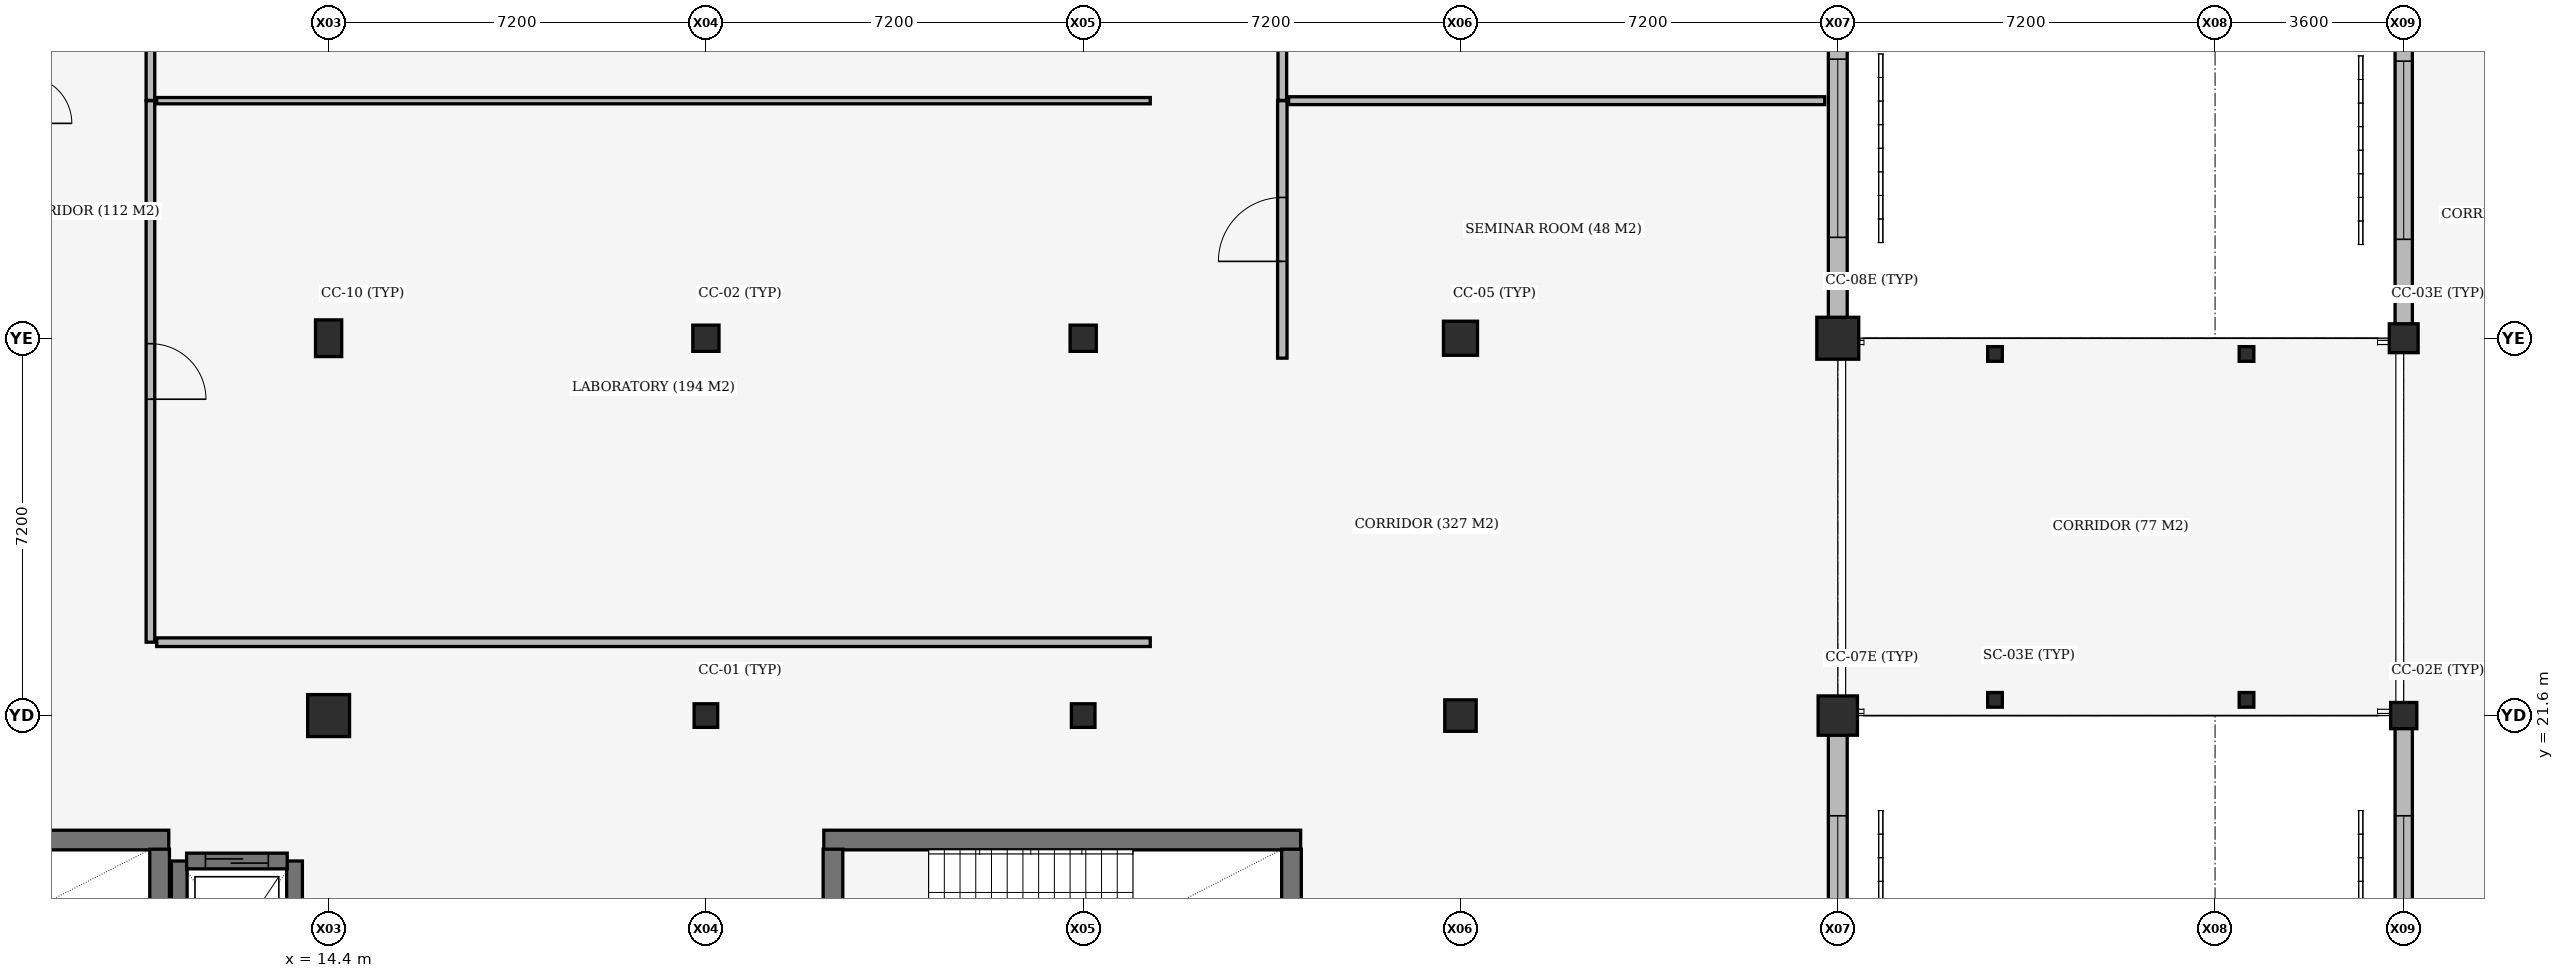
"""IFC4 building model, lengths in metres.
Left out: names, types, materials, properties, quantities, classifications, styles, units other than length and angle.
Written with IfcOpenShell. Run it as: python <this file> out.ifc"""

import sys

from ifc_helpers import new_model, si_unit, direction, frame, frame_2d, origin, origin_2d, place, context, subcontext, project, spatial, rectangle, i_section, extrude, element, fill, save


model = new_model("IFC4")
c1 = context("Model", 3, precision=1e-05, world=origin(), true_north=direction((0.0, 1.0)))
c2 = subcontext(c1, "Body", "Model", "MODEL_VIEW")
j1 = project(units=[si_unit("LENGTHUNIT", "METRE"), si_unit("PLANEANGLEUNIT", "RADIAN")], contexts=[c1])
p1 = place(None, origin())
s1 = spatial("IfcSite", under=j1, at=p1, CompositionType="ELEMENT")
p2 = place(p1, origin())
s2 = spatial("IfcBuilding", under=s1, at=p2, CompositionType="ELEMENT")
p3 = place(p2, frame((0.0, 0.0, 5.4)))
s3 = spatial("IfcBuildingStorey", under=s2, at=p3, CompositionType="ELEMENT", Elevation=5.4)
p4 = place(p3, frame((54.0, 21.6, 0.0), z_axis=(0.0, 0.0, 1.0), x_axis=(1.0, 0.0, 0.0)))
e1 = element("IfcColumn", 1, at=p4, inside=s3, PredefinedType="COLUMN", context=c2, shape_type="SweptSolid", body=[
    extrude(rectangle(XDim=0.5, YDim=0.5, at=origin_2d()), origin(), (0.0, 0.0, 1.0), 3.92),
])
p5 = place(p3, frame((54.0, 28.8, 0.0), z_axis=(0.0, 0.0, 1.0), x_axis=(1.0, 0.0, 0.0)))
e2 = element("IfcColumn", 2, at=p5, inside=s3, PredefinedType="COLUMN", context=c2, shape_type="SweptSolid", body=[
    extrude(rectangle(XDim=0.55, YDim=0.55, at=origin_2d()), origin(), (0.0, 0.0, 1.0), 3.92),
])
p6 = place(p3, frame((14.4, 21.6, 0.0), z_axis=(0.0, 0.0, 1.0), x_axis=(1.0, 0.0, 0.0)))
e3 = element("IfcColumn", 3, at=p6, inside=s3, PredefinedType="COLUMN", context=c2, shape_type="SweptSolid", body=[
    extrude(rectangle(XDim=0.8, YDim=0.8, at=origin_2d()), origin(), (0.0, 0.0, 1.0), 3.89),
])
p7 = place(p3, frame((14.4, 28.8, 0.0), z_axis=(0.0, 0.0, 1.0), x_axis=(1.0, 0.0, 0.0)))
e4 = element("IfcColumn", 4, at=p7, inside=s3, PredefinedType="COLUMN", context=c2, shape_type="SweptSolid", body=[
    extrude(rectangle(XDim=0.5, YDim=0.7, at=origin_2d()), origin(), (0.0, 0.0, 1.0), 3.89),
])
p8 = place(p3, frame((21.6, 21.6, 0.0), z_axis=(0.0, 0.0, 1.0), x_axis=(1.0, 0.0, 0.0)))
e5 = element("IfcColumn", 5, at=p8, inside=s3, PredefinedType="COLUMN", context=c2, shape_type="SweptSolid", body=[
    extrude(rectangle(XDim=0.45, YDim=0.45, at=origin_2d()), origin(), (0.0, 0.0, 1.0), 3.89),
])
p9 = place(p3, frame((21.6, 28.8, 0.0), z_axis=(0.0, 0.0, 1.0), x_axis=(1.0, 0.0, 0.0)))
e6 = element("IfcColumn", 6, at=p9, inside=s3, PredefinedType="COLUMN", context=c2, shape_type="SweptSolid", body=[
    extrude(rectangle(XDim=0.5, YDim=0.5, at=origin_2d()), origin(), (0.0, 0.0, 1.0), 3.89),
])
p10 = place(p3, frame((28.8, 21.6, 0.0), z_axis=(0.0, 0.0, 1.0), x_axis=(1.0, 0.0, 0.0)))
e7 = element("IfcColumn", 7, at=p10, inside=s3, PredefinedType="COLUMN", context=c2, shape_type="SweptSolid", body=[
    extrude(rectangle(XDim=0.45, YDim=0.45, at=origin_2d()), origin(), (0.0, 0.0, 1.0), 3.89),
])
p11 = place(p3, frame((28.8, 28.8, 0.0), z_axis=(0.0, 0.0, 1.0), x_axis=(1.0, 0.0, 0.0)))
e8 = element("IfcColumn", 8, at=p11, inside=s3, PredefinedType="COLUMN", context=c2, shape_type="SweptSolid", body=[
    extrude(rectangle(XDim=0.5, YDim=0.5, at=origin_2d()), origin(), (0.0, 0.0, 1.0), 3.89),
])
p12 = place(p3, frame((36.0, 21.6, 0.0), z_axis=(0.0, 0.0, 1.0), x_axis=(1.0, 0.0, 0.0)))
e9 = element("IfcColumn", 9, at=p12, inside=s3, PredefinedType="COLUMN", context=c2, shape_type="SweptSolid", body=[
    extrude(rectangle(XDim=0.6, YDim=0.6, at=origin_2d()), origin(), (0.0, 0.0, 1.0), 3.89),
])
p13 = place(p3, frame((36.0, 28.8, 0.0), z_axis=(0.0, 0.0, 1.0), x_axis=(1.0, 0.0, 0.0)))
e10 = element("IfcColumn", 10, at=p13, inside=s3, PredefinedType="COLUMN", context=c2, shape_type="SweptSolid", body=[
    extrude(rectangle(XDim=0.65, YDim=0.65, at=origin_2d()), origin(), (0.0, 0.0, 1.0), 3.89),
])
p14 = place(p3, frame((43.2, 21.6, 0.0), z_axis=(0.0, 0.0, 1.0), x_axis=(1.0, 0.0, 0.0)))
e11 = element("IfcColumn", 11, at=p14, inside=s3, PredefinedType="COLUMN", context=c2, shape_type="SweptSolid", body=[
    extrude(rectangle(XDim=0.75, YDim=0.75, at=origin_2d()), origin(), (0.0, 0.0, 1.0), 3.89),
])
p15 = place(p3, frame((43.2, 28.8, 0.0), z_axis=(0.0, 0.0, 1.0), x_axis=(1.0, 0.0, 0.0)))
e12 = element("IfcColumn", 12, at=p15, inside=s3, PredefinedType="COLUMN", context=c2, shape_type="SweptSolid", body=[
    extrude(rectangle(XDim=0.8, YDim=0.8, at=origin_2d()), origin(), (0.0, 0.0, 1.0), 3.89),
])
for number, where, z_axis, x_axis in (
    (13, (46.2, 21.9, 0.0), (0.0, 0.0, 1.0), (1.0, 0.0, 0.0)),
    (14, (51.0, 21.9, 0.0), (0.0, 0.0, 1.0), (1.0, 0.0, 0.0)),
    (15, (46.2, 28.5, 0.0), (0.0, 0.0, 1.0), (1.0, 0.0, 0.0)),
    (16, (51.0, 28.5, 0.0), (0.0, 0.0, 1.0), (1.0, 0.0, 0.0)),
):
    element("IfcColumn", number, at=place(p3, frame(where, z_axis=z_axis, x_axis=x_axis)), inside=s3, PredefinedType="COLUMN", context=c2, shape_type="SweptSolid", body=[
        extrude(i_section(OverallWidth=0.28, OverallDepth=0.28, WebThickness=0.01, FlangeThickness=0.018, FilletRadius=0.024, at=origin_2d()), origin(), (0.0, 0.0, 1.0), 3.935),
    ])
p16 = place(p3, frame((11.35, 19.225, 0.0), z_axis=(0.0, 0.0, 1.0), x_axis=(-1.0, 0.0, 0.0)))
e17 = element("IfcWall", 17, at=p16, inside=s3, PredefinedType="SHEAR", context=c2, shape_type="SweptSolid", body=[
    extrude(rectangle(XDim=9.1, YDim=0.375, at=frame_2d((4.55, 0.0))), origin(), (0.0, 0.0, 1.0), 3.89),
])
p17 = place(p3, frame((11.175, 15.6, 0.0), z_axis=(0.0, 0.0, 1.0), x_axis=(0.0, 1.0, 0.0)))
e18 = element("IfcWall", 18, at=p17, inside=s3, PredefinedType="SHEAR", context=c2, shape_type="SweptSolid", body=[
    extrude(rectangle(XDim=3.45, YDim=0.375, at=frame_2d((1.725, 0.0))), origin(), (0.0, 0.0, 1.0), 3.89),
])
p18 = place(p3, frame((32.95, 19.225, 0.0), z_axis=(0.0, 0.0, 1.0), x_axis=(-1.0, 0.0, 0.0)))
e19 = element("IfcWall", 19, at=p18, inside=s3, PredefinedType="SHEAR", context=c2, shape_type="SweptSolid", body=[
    extrude(rectangle(XDim=9.1, YDim=0.375, at=frame_2d((4.55, 0.0))), origin(), (0.0, 0.0, 1.0), 3.89),
])
p19 = place(p3, frame((32.775, 15.6, 0.0), z_axis=(0.0, 0.0, 1.0), x_axis=(0.0, 1.0, 0.0)))
e20 = element("IfcWall", 20, at=p19, inside=s3, PredefinedType="SHEAR", context=c2, shape_type="SweptSolid", body=[
    extrude(rectangle(XDim=3.45, YDim=0.375, at=frame_2d((1.725, 0.0))), origin(), (0.0, 0.0, 1.0), 3.89),
])
for number, where, z_axis, x_axis in (
    (21, (11.55, 18.825, 0.0), (0.0, 0.0, 1.0), (0.0, -1.0, 0.0)),
    (22, (13.75, 15.825, 0.0), (0.0, 0.0, 1.0), (0.0, 1.0, 0.0)),
):
    element("IfcWall", number, at=place(p3, frame(where, z_axis=z_axis, x_axis=x_axis)), inside=s3, PredefinedType="SHEAR", context=c2, shape_type="SweptSolid", body=[
        extrude(rectangle(XDim=3.0, YDim=0.3, at=frame_2d((1.5, 0.0))), origin(), (0.0, 0.0, 1.0), 3.89),
    ])
p20 = place(p3, frame((54.0, 14.617, 0.0), z_axis=(0.0, 0.0, 1.0), x_axis=(0.0, 1.0, 0.0)))
e23 = element("IfcWall", 23, at=p20, inside=s3, PredefinedType="STANDARD", context=c2, shape_type="SweptSolid", body=[
    extrude(rectangle(XDim=6.741, YDim=0.33, at=frame_2d((3.371, 0.0))), origin(), (0.0, 0.0, 1.0), 3.28),
])
p21 = place(p20, frame((1.67, 0.0, 0.9)))
e24 = element("IfcOpeningElement", 24, at=p21, cuts=e23, PredefinedType="OPENING", context=c2, shape_type="SweptSolid", body=[
    extrude(rectangle(XDim=3.4, YDim=1.5, at=frame_2d((1.7, 0.75))), frame((0.0, 0.175, 0.0), z_axis=(0.0, -1.0, 0.0), x_axis=(1.0, 0.0, 0.0)), (0.0, 0.0, 1.0), 0.35),
])
p22 = place(p3, frame((54.0, 29.067, 0.0), z_axis=(0.0, 0.0, 1.0), x_axis=(0.0, 1.0, 0.0)))
e25 = element("IfcWall", 25, at=p22, inside=s3, PredefinedType="STANDARD", context=c2, shape_type="SweptSolid", body=[
    extrude(rectangle(XDim=6.641, YDim=0.33, at=frame_2d((3.321, 0.0))), origin(), (0.0, 0.0, 1.0), 3.18),
])
p23 = place(p22, frame((1.621, 0.0, 0.9)))
e26 = element("IfcOpeningElement", 26, at=p23, cuts=e25, PredefinedType="OPENING", context=c2, shape_type="SweptSolid", body=[
    extrude(rectangle(XDim=3.4, YDim=1.5, at=frame_2d((1.7, 0.75))), frame((0.0, 0.175, 0.0), z_axis=(0.0, -1.0, 0.0), x_axis=(1.0, 0.0, 0.0)), (0.0, 0.0, 1.0), 0.35),
])
p24 = place(p3, frame((43.2, 21.233, 0.0), z_axis=(0.0, 0.0, 1.0), x_axis=(0.0, -1.0, 0.0)))
e27 = element("IfcWall", 27, at=p24, inside=s3, PredefinedType="STANDARD", context=c2, shape_type="SweptSolid", body=[
    extrude(rectangle(XDim=6.491, YDim=0.36, at=frame_2d((3.246, 0.0))), origin(), (0.0, 0.0, 1.0), 3.21),
])
p25 = place(p24, frame((1.545, 0.0, 0.9)))
e28 = element("IfcOpeningElement", 28, at=p25, cuts=e27, PredefinedType="OPENING", context=c2, shape_type="SweptSolid", body=[
    extrude(rectangle(XDim=3.4, YDim=1.5, at=frame_2d((1.7, 0.75))), frame((0.0, 0.19, 0.0), z_axis=(0.0, -1.0, 0.0), x_axis=(1.0, 0.0, 0.0)), (0.0, 0.0, 1.0), 0.38),
])
p26 = place(p3, frame((43.2, 35.658, 0.0), z_axis=(0.0, 0.0, 1.0), x_axis=(0.0, -1.0, 0.0)))
e29 = element("IfcWall", 29, at=p26, inside=s3, PredefinedType="STANDARD", context=c2, shape_type="SweptSolid", body=[
    extrude(rectangle(XDim=6.466, YDim=0.36, at=frame_2d((3.233, 0.0))), origin(), (0.0, 0.0, 1.0), 3.37),
])
p27 = place(p26, frame((1.533, 0.0, 0.9)))
e30 = element("IfcOpeningElement", 30, at=p27, cuts=e29, PredefinedType="OPENING", context=c2, shape_type="SweptSolid", body=[
    extrude(rectangle(XDim=3.4, YDim=1.5, at=frame_2d((1.7, 0.75))), frame((0.0, 0.19, 0.0), z_axis=(0.0, -1.0, 0.0), x_axis=(1.0, 0.0, 0.0)), (0.0, 0.0, 1.0), 0.38),
])
p28 = place(p3, frame((24.025, 19.05, 0.0), z_axis=(0.0, 0.0, 1.0), x_axis=(0.0, -1.0, 0.0)))
e31 = element("IfcWall", 31, at=p28, inside=s3, PredefinedType="SHEAR", context=c2, shape_type="SweptSolid", body=[
    extrude(rectangle(XDim=3.45, YDim=0.375, at=frame_2d((1.725, 0.0))), origin(), (0.0, 0.0, 1.0), 3.89),
])
p29 = place(p28, frame((1.035, 0.0, 0.0)))
e32 = element("IfcOpeningElement", 32, at=p29, cuts=e31, PredefinedType="OPENING", context=c2, shape_type="SweptSolid", body=[
    extrude(rectangle(XDim=1.38, YDim=2.2, at=frame_2d((0.69, 1.1))), frame((0.0, 0.198, 0.0), z_axis=(0.0, -1.0, 0.0), x_axis=(1.0, 0.0, 0.0)), (0.0, 0.0, 1.0), 0.395),
])
p30 = place(p3, frame((11.69, 18.825, 0.0), z_axis=(0.0, 0.0, 1.0), x_axis=(1.0, 0.0, 0.0)))
e33 = element("IfcWall", 33, at=p30, inside=s3, PredefinedType="SHEAR", context=c2, shape_type="SweptSolid", body=[
    extrude(rectangle(XDim=1.92, YDim=0.3, at=frame_2d((0.96, 0.0))), origin(), (0.0, 0.0, 1.0), 3.89),
])
p31 = place(p30, frame((0.36, 0.0, 0.0)))
e34 = element("IfcOpeningElement", 34, at=p31, cuts=e33, PredefinedType="OPENING", context=c2, shape_type="SweptSolid", body=[
    extrude(rectangle(XDim=1.2, YDim=2.1, at=frame_2d((0.6, 1.05))), frame((0.0, 0.16, 0.0), z_axis=(0.0, -1.0, 0.0), x_axis=(1.0, 0.0, 0.0)), (0.0, 0.0, 1.0), 0.32),
])
p32 = place(p3, frame((11.0, 23.0, 0.0), z_axis=(0.0, 0.0, 1.0), x_axis=(0.0, 1.0, 0.0)))
e35 = element("IfcWall", 35, at=p32, inside=s3, PredefinedType="PARTITIONING", context=c2, shape_type="SweptSolid", body=[
    extrude(rectangle(XDim=10.333, YDim=0.165, at=frame_2d((5.167, 0.0))), origin(), (0.0, 0.0, 1.0), 3.21),
])
p33 = place(p32, frame((4.636, 0.0, 0.0)))
e36 = element("IfcOpeningElement", 36, at=p33, cuts=e35, PredefinedType="OPENING", context=c2, shape_type="SweptSolid", body=[
    extrude(rectangle(XDim=1.06, YDim=2.2, at=frame_2d((0.53, 1.1))), frame((0.0, 0.093, 0.0), z_axis=(0.0, -1.0, 0.0), x_axis=(1.0, 0.0, 0.0)), (0.0, 0.0, 1.0), 0.185),
])
p34 = place(p3, frame((11.12, 23.0, 0.0), z_axis=(0.0, 0.0, 1.0), x_axis=(1.0, 0.0, 0.0)))
e37 = element("IfcWall", 37, at=p34, inside=s3, PredefinedType="PARTITIONING", context=c2, shape_type="SweptSolid", body=[
    extrude(rectangle(XDim=18.96, YDim=0.165, at=frame_2d((9.48, 0.0))), origin(), (0.0, 0.0, 1.0), 3.21),
])
p35 = place(p3, frame((11.12, 33.333, 0.0), z_axis=(0.0, 0.0, 1.0), x_axis=(1.0, 0.0, 0.0)))
e38 = element("IfcWall", 38, at=p35, inside=s3, PredefinedType="PARTITIONING", context=c2, shape_type="SweptSolid", body=[
    extrude(rectangle(XDim=18.96, YDim=0.12, at=frame_2d((9.48, 0.0))), origin(), (0.0, 0.0, 1.0), 3.15),
])
p36 = place(p3, frame((11.0, 33.338, 0.0), z_axis=(0.0, 0.0, 1.0), x_axis=(0.0, 1.0, 0.0)))
e39 = element("IfcWall", 39, at=p36, inside=s3, PredefinedType="PARTITIONING", context=c2, shape_type="SweptSolid", body=[
    extrude(rectangle(XDim=12.912, YDim=0.165, at=frame_2d((6.456, 0.0))), origin(), (0.0, 0.0, 1.0), 3.15),
])
p37 = place(p36, frame((5.931, 0.0, 0.0)))
e40 = element("IfcOpeningElement", 40, at=p37, cuts=e39, PredefinedType="OPENING", context=c2, shape_type="SweptSolid", body=[
    extrude(rectangle(XDim=1.05, YDim=2.2, at=frame_2d((0.525, 1.1))), frame((0.0, 0.093, 0.0), z_axis=(0.0, -1.0, 0.0), x_axis=(1.0, 0.0, 0.0)), (0.0, 0.0, 1.0), 0.185),
])
p38 = place(p3, frame((32.6, 28.42, 0.0), z_axis=(0.0, 0.0, 1.0), x_axis=(0.0, 1.0, 0.0)))
e41 = element("IfcWall", 41, at=p38, inside=s3, PredefinedType="PARTITIONING", context=c2, shape_type="SweptSolid", body=[
    extrude(rectangle(XDim=4.913, YDim=0.18, at=frame_2d((2.457, 0.0))), origin(), (0.0, 0.0, 1.0), 3.31),
])
p39 = place(p38, frame((1.846, 0.0, 0.0)))
e42 = element("IfcOpeningElement", 42, at=p39, cuts=e41, PredefinedType="OPENING", context=c2, shape_type="SweptSolid", body=[
    extrude(rectangle(XDim=1.22, YDim=2.25, at=frame_2d((0.61, 1.125))), frame((0.0, 0.1, 0.0), z_axis=(0.0, -1.0, 0.0), x_axis=(1.0, 0.0, 0.0)), (0.0, 0.0, 1.0), 0.2),
])
p40 = place(p3, frame((32.72, 33.333, 0.0), z_axis=(0.0, 0.0, 1.0), x_axis=(1.0, 0.0, 0.0)))
e43 = element("IfcWall", 43, at=p40, inside=s3, PredefinedType="PARTITIONING", context=c2, shape_type="SweptSolid", body=[
    extrude(rectangle(XDim=10.23, YDim=0.15, at=frame_2d((5.115, 0.0))), origin(), (0.0, 0.0, 1.0), 3.21),
])
p41 = place(p3, frame((32.6, 33.338, 0.0), z_axis=(0.0, 0.0, 1.0), x_axis=(0.0, 1.0, 0.0)))
e44 = element("IfcWall", 44, at=p41, inside=s3, PredefinedType="PARTITIONING", context=c2, shape_type="SweptSolid", body=[
    extrude(rectangle(XDim=12.912, YDim=0.165, at=frame_2d((6.456, 0.0))), origin(), (0.0, 0.0, 1.0), 3.25),
])
p42 = place(p41, frame((5.926, 0.0, 0.0)))
e45 = element("IfcOpeningElement", 45, at=p42, cuts=e44, PredefinedType="OPENING", context=c2, shape_type="SweptSolid", body=[
    extrude(rectangle(XDim=1.06, YDim=2.2, at=frame_2d((0.53, 1.1))), frame((0.0, 0.093, 0.0), z_axis=(0.0, -1.0, 0.0), x_axis=(1.0, 0.0, 0.0)), (0.0, 0.0, 1.0), 0.185),
])
p43 = place(p21, origin())
e46 = element("IfcWindow", 46, at=p43, inside=s3, PartitioningType="DOUBLE_PANEL_VERTICAL", PredefinedType="WINDOW", context=c2, shape_type="SweptSolid", body=[
    extrude(rectangle(XDim=3.4, YDim=1.5, at=frame_2d((1.7, 0.75))), frame((0.0, 0.03, 0.0), z_axis=(0.0, -1.0, 0.0), x_axis=(1.0, 0.0, 0.0)), (0.0, 0.0, 1.0), 0.06),
])
fill(e24, e46)
p44 = place(p23, origin())
e47 = element("IfcWindow", 47, at=p44, inside=s3, PartitioningType="DOUBLE_PANEL_VERTICAL", PredefinedType="WINDOW", context=c2, shape_type="SweptSolid", body=[
    extrude(rectangle(XDim=3.4, YDim=1.5, at=frame_2d((1.7, 0.75))), frame((0.0, 0.03, 0.0), z_axis=(0.0, -1.0, 0.0), x_axis=(1.0, 0.0, 0.0)), (0.0, 0.0, 1.0), 0.06),
])
fill(e26, e47)
p45 = place(p25, origin())
e48 = element("IfcWindow", 48, at=p45, inside=s3, PartitioningType="DOUBLE_PANEL_VERTICAL", PredefinedType="WINDOW", context=c2, shape_type="SweptSolid", body=[
    extrude(rectangle(XDim=3.4, YDim=1.5, at=frame_2d((1.7, 0.75))), frame((0.0, 0.03, 0.0), z_axis=(0.0, -1.0, 0.0), x_axis=(1.0, 0.0, 0.0)), (0.0, 0.0, 1.0), 0.06),
])
fill(e28, e48)
p46 = place(p27, origin())
e49 = element("IfcWindow", 49, at=p46, inside=s3, PartitioningType="DOUBLE_PANEL_VERTICAL", PredefinedType="WINDOW", context=c2, shape_type="SweptSolid", body=[
    extrude(rectangle(XDim=3.4, YDim=1.5, at=frame_2d((1.7, 0.75))), frame((0.0, 0.03, 0.0), z_axis=(0.0, -1.0, 0.0), x_axis=(1.0, 0.0, 0.0)), (0.0, 0.0, 1.0), 0.06),
])
fill(e30, e49)
p47 = place(p31, origin())
e50 = element("IfcDoor", 50, at=p47, inside=s3, OperationType="SLIDING_TO_LEFT", PredefinedType="DOOR", context=c2, shape_type="SweptSolid", body=[
    extrude(rectangle(XDim=1.2, YDim=2.1, at=frame_2d((0.6, 1.05))), frame((0.0, 0.025, 0.0), z_axis=(0.0, -1.0, 0.0), x_axis=(1.0, 0.0, 0.0)), (0.0, 0.0, 1.0), 0.05),
])
fill(e34, e50)
p48 = place(p33, origin())
e51 = element("IfcDoor", 51, at=p48, inside=s3, OperationType="SINGLE_SWING_RIGHT", PredefinedType="DOOR", context=c2, shape_type="SweptSolid", body=[
    extrude(rectangle(XDim=1.06, YDim=2.2, at=frame_2d((0.53, 1.1))), frame((0.0, 0.025, 0.0), z_axis=(0.0, -1.0, 0.0), x_axis=(1.0, 0.0, 0.0)), (0.0, 0.0, 1.0), 0.05),
])
fill(e36, e51)
p49 = place(p39, origin())
e52 = element("IfcDoor", 52, at=p49, inside=s3, OperationType="SINGLE_SWING_LEFT", PredefinedType="DOOR", context=c2, shape_type="SweptSolid", body=[
    extrude(rectangle(XDim=1.22, YDim=2.25, at=frame_2d((0.61, 1.125))), frame((0.0, 0.025, 0.0), z_axis=(0.0, -1.0, 0.0), x_axis=(1.0, 0.0, 0.0)), (0.0, 0.0, 1.0), 0.05),
])
fill(e42, e52)
save(model, sys.argv[1])
